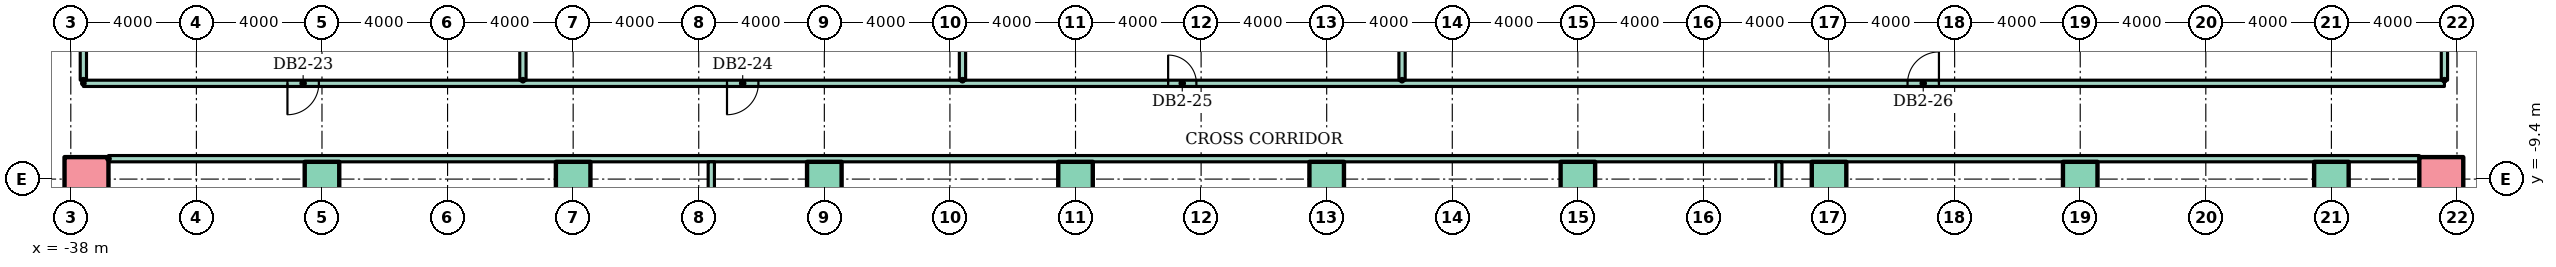
"""IFC4 building model, lengths in metres.
Left out: names, types, materials, properties, quantities, classifications, styles, units other than length and angle.
Written with IfcOpenShell. Run it as: python <this file> out.ifc"""

import sys

from ifc_helpers import new_model, si_unit, direction, frame, frame_2d, origin, origin_2d, place, context, subcontext, project, spatial, rectangle, hollow_rectangle, extrude, element, fill, save


model = new_model("IFC4")
c1 = context("Model", 3, precision=1e-05, world=origin(), true_north=direction((0.0, 1.0)))
c2 = subcontext(c1, "Body", "Model", "MODEL_VIEW")
j1 = project(units=[si_unit("LENGTHUNIT", "METRE"), si_unit("PLANEANGLEUNIT", "RADIAN")], contexts=[c1])
p1 = place(None, origin())
s1 = spatial("IfcSite", under=j1, at=p1, CompositionType="ELEMENT")
p2 = place(p1, origin())
s2 = spatial("IfcBuilding", under=s1, at=p2, CompositionType="ELEMENT")
p3 = place(p2, frame((0.0, 0.0, -10.0)))
s3 = spatial("IfcBuildingStorey", under=s2, at=p3, CompositionType="ELEMENT", Elevation=-10.0)
p4 = place(p3, frame((-37.5, -9.4, -0.3)))
e1 = element("IfcColumn", 1, at=p4, inside=s3, PredefinedType="COLUMN", context=c2, shape_type="SweptSolid", body=[
    extrude(hollow_rectangle(XDim=1.4, YDim=1.4, WallThickness=0.08, at=origin_2d()), origin(), (0.0, 0.0, 1.0), 5.3),
])
for number, where in (
    (2, (-30.0, -9.4, -0.3)),
    (3, (-22.0, -9.4, -0.3)),
    (4, (-14.0, -9.4, -0.3)),
    (5, (-6.0, -9.4, -0.3)),
    (6, (2.0, -9.4, -0.3)),
    (7, (10.0, -9.4, -0.3)),
    (8, (18.0, -9.4, -0.3)),
    (9, (26.0, -9.4, -0.3)),
    (10, (34.0, -9.4, -0.3)),
):
    element("IfcColumn", number, at=place(p3, frame(where)), inside=s3, PredefinedType="COLUMN", context=c2, shape_type="SweptSolid", body=[
        extrude(rectangle(XDim=1.1, YDim=1.1, at=origin_2d()), origin(), (0.0, 0.0, 1.0), 5.3),
    ])
p5 = place(p3, frame((37.5, -9.4, -0.3)))
e11 = element("IfcColumn", 11, at=p5, inside=s3, PredefinedType="COLUMN", context=c2, shape_type="SweptSolid", body=[
    extrude(hollow_rectangle(XDim=1.4, YDim=1.4, WallThickness=0.08, at=origin_2d()), origin(), (0.0, 0.0, 1.0), 5.3),
])
p6 = place(p3, frame((-36.8, -8.75, 0.0)))
e12 = element("IfcWall", 12, at=p6, inside=s3, PredefinedType="PARTITIONING", context=c2, shape_type="SweptSolid", body=[
    extrude(rectangle(XDim=73.6, YDim=0.2, at=frame_2d((36.8, 0.0))), origin(), (0.0, 0.0, 1.0), 4.65),
])
p7 = place(p3, frame((-37.6, -6.35, 0.0)))
e13 = element("IfcWall", 13, at=p7, inside=s3, PredefinedType="PARTITIONING", context=c2, shape_type="SweptSolid", body=[
    extrude(rectangle(XDim=75.2, YDim=0.2, at=frame_2d((37.6, 0.0))), origin(), (0.0, 0.0, 1.0), 4.65),
])
p8 = place(p7, frame((6.5, 0.0, 0.0)))
e14 = element("IfcOpeningElement", 14, at=p8, cuts=e13, PredefinedType="OPENING", context=c2, shape_type="SweptSolid", body=[
    extrude(rectangle(XDim=1.0, YDim=2.1, at=frame_2d((0.5, 1.05))), frame((0.0, 0.11, 0.0), z_axis=(0.0, -1.0, 0.0), x_axis=(1.0, 0.0, 0.0)), (0.0, 0.0, 1.0), 0.22),
])
p9 = place(p7, frame((20.5, 0.0, 0.0)))
e15 = element("IfcOpeningElement", 15, at=p9, cuts=e13, PredefinedType="OPENING", context=c2, shape_type="SweptSolid", body=[
    extrude(rectangle(XDim=1.0, YDim=2.1, at=frame_2d((0.5, 1.05))), frame((0.0, 0.11, 0.0), z_axis=(0.0, -1.0, 0.0), x_axis=(1.0, 0.0, 0.0)), (0.0, 0.0, 1.0), 0.22),
])
p10 = place(p7, frame((34.55, 0.0, 0.0)))
e16 = element("IfcOpeningElement", 16, at=p10, cuts=e13, PredefinedType="OPENING", context=c2, shape_type="SweptSolid", body=[
    extrude(rectangle(XDim=0.9, YDim=2.1, at=frame_2d((0.45, 1.05))), frame((0.0, 0.11, 0.0), z_axis=(0.0, -1.0, 0.0), x_axis=(1.0, 0.0, 0.0)), (0.0, 0.0, 1.0), 0.22),
])
p11 = place(p7, frame((58.1, 0.0, 0.0)))
e17 = element("IfcOpeningElement", 17, at=p11, cuts=e13, PredefinedType="OPENING", context=c2, shape_type="SweptSolid", body=[
    extrude(rectangle(XDim=1.0, YDim=2.1, at=frame_2d((0.5, 1.05))), frame((0.0, 0.11, 0.0), z_axis=(0.0, -1.0, 0.0), x_axis=(1.0, 0.0, 0.0)), (0.0, 0.0, 1.0), 0.22),
])
p12 = place(p3, frame((-37.6, -6.25, 0.0), z_axis=(0.0, 0.0, 1.0), x_axis=(0.0, 1.0, 0.0)))
e18 = element("IfcWall", 18, at=p12, inside=s3, PredefinedType="PARTITIONING", context=c2, shape_type="SweptSolid", body=[
    extrude(rectangle(XDim=3.55, YDim=0.2, at=frame_2d((1.775, 0.0))), origin(), (0.0, 0.0, 1.0), 4.65),
])
p13 = place(p3, frame((-23.6, -6.25, 0.0), z_axis=(0.0, 0.0, 1.0), x_axis=(0.0, 1.0, 0.0)))
e19 = element("IfcWall", 19, at=p13, inside=s3, PredefinedType="PARTITIONING", context=c2, shape_type="SweptSolid", body=[
    extrude(rectangle(XDim=4.75, YDim=0.2, at=frame_2d((2.375, 0.0))), origin(), (0.0, 0.0, 1.0), 4.65),
])
p14 = place(p3, frame((-17.6, -19.5, 0.0), z_axis=(0.0, 0.0, 1.0), x_axis=(0.0, 1.0, 0.0)))
e20 = element("IfcWall", 20, at=p14, inside=s3, PredefinedType="PARTITIONING", context=c2, shape_type="SweptSolid", body=[
    extrude(rectangle(XDim=10.65, YDim=0.2, at=frame_2d((5.325, 0.0))), origin(), (0.0, 0.0, 1.0), 4.65),
])
for number, where, z_axis, x_axis in (
    (21, (-9.6, -6.25, 0.0), (0.0, 0.0, 1.0), (0.0, 1.0, 0.0)),
    (22, (4.4, -6.25, 0.0), (0.0, 0.0, 1.0), (0.0, 1.0, 0.0)),
):
    element("IfcWall", number, at=place(p3, frame(where, z_axis=z_axis, x_axis=x_axis)), inside=s3, PredefinedType="PARTITIONING", context=c2, shape_type="SweptSolid", body=[
        extrude(rectangle(XDim=4.85, YDim=0.2, at=frame_2d((2.425, 0.0))), origin(), (0.0, 0.0, 1.0), 4.65),
    ])
p15 = place(p3, frame((16.4, -19.5, 0.0), z_axis=(0.0, 0.0, 1.0), x_axis=(0.0, 1.0, 0.0)))
e23 = element("IfcWall", 23, at=p15, inside=s3, PredefinedType="PARTITIONING", context=c2, shape_type="SweptSolid", body=[
    extrude(rectangle(XDim=10.65, YDim=0.2, at=frame_2d((5.325, 0.0))), origin(), (0.0, 0.0, 1.0), 4.65),
])
p16 = place(p3, frame((37.6, -6.25, 0.0), z_axis=(0.0, 0.0, 1.0), x_axis=(0.0, 1.0, 0.0)))
e24 = element("IfcWall", 24, at=p16, inside=s3, PredefinedType="PARTITIONING", context=c2, shape_type="SweptSolid", body=[
    extrude(rectangle(XDim=3.55, YDim=0.2, at=frame_2d((1.775, 0.0))), origin(), (0.0, 0.0, 1.0), 4.65),
])
p17 = place(p8, frame((1.0, 0.0, 0.0), z_axis=(0.0, 0.0, 1.0), x_axis=(-1.0, 0.0, 0.0)))
e25 = element("IfcDoor", 25, at=p17, inside=s3, OperationType="SINGLE_SWING_LEFT", PredefinedType="DOOR", context=c2, shape_type="SweptSolid", body=[
    extrude(rectangle(XDim=1.0, YDim=2.1, at=frame_2d((0.5, 1.05))), frame((0.0, 0.025, 0.0), z_axis=(0.0, -1.0, 0.0), x_axis=(1.0, 0.0, 0.0)), (0.0, 0.0, 1.0), 0.05),
])
fill(e14, e25)
p18 = place(p9, frame((1.0, 0.0, 0.0), z_axis=(0.0, 0.0, 1.0), x_axis=(-1.0, 0.0, 0.0)))
e26 = element("IfcDoor", 26, at=p18, inside=s3, OperationType="SINGLE_SWING_LEFT", PredefinedType="DOOR", context=c2, shape_type="SweptSolid", body=[
    extrude(rectangle(XDim=1.0, YDim=2.1, at=frame_2d((0.5, 1.05))), frame((0.0, 0.025, 0.0), z_axis=(0.0, -1.0, 0.0), x_axis=(1.0, 0.0, 0.0)), (0.0, 0.0, 1.0), 0.05),
])
fill(e15, e26)
p19 = place(p10, origin())
e27 = element("IfcDoor", 27, at=p19, inside=s3, OperationType="SINGLE_SWING_LEFT", PredefinedType="DOOR", context=c2, shape_type="SweptSolid", body=[
    extrude(rectangle(XDim=0.9, YDim=2.1, at=frame_2d((0.45, 1.05))), frame((0.0, 0.025, 0.0), z_axis=(0.0, -1.0, 0.0), x_axis=(1.0, 0.0, 0.0)), (0.0, 0.0, 1.0), 0.05),
])
fill(e16, e27)
p20 = place(p11, origin())
e28 = element("IfcDoor", 28, at=p20, inside=s3, OperationType="SINGLE_SWING_RIGHT", PredefinedType="DOOR", context=c2, shape_type="SweptSolid", body=[
    extrude(rectangle(XDim=1.0, YDim=2.1, at=frame_2d((0.5, 1.05))), frame((0.0, 0.025, 0.0), z_axis=(0.0, -1.0, 0.0), x_axis=(1.0, 0.0, 0.0)), (0.0, 0.0, 1.0), 0.05),
])
fill(e17, e28)
save(model, sys.argv[1])
